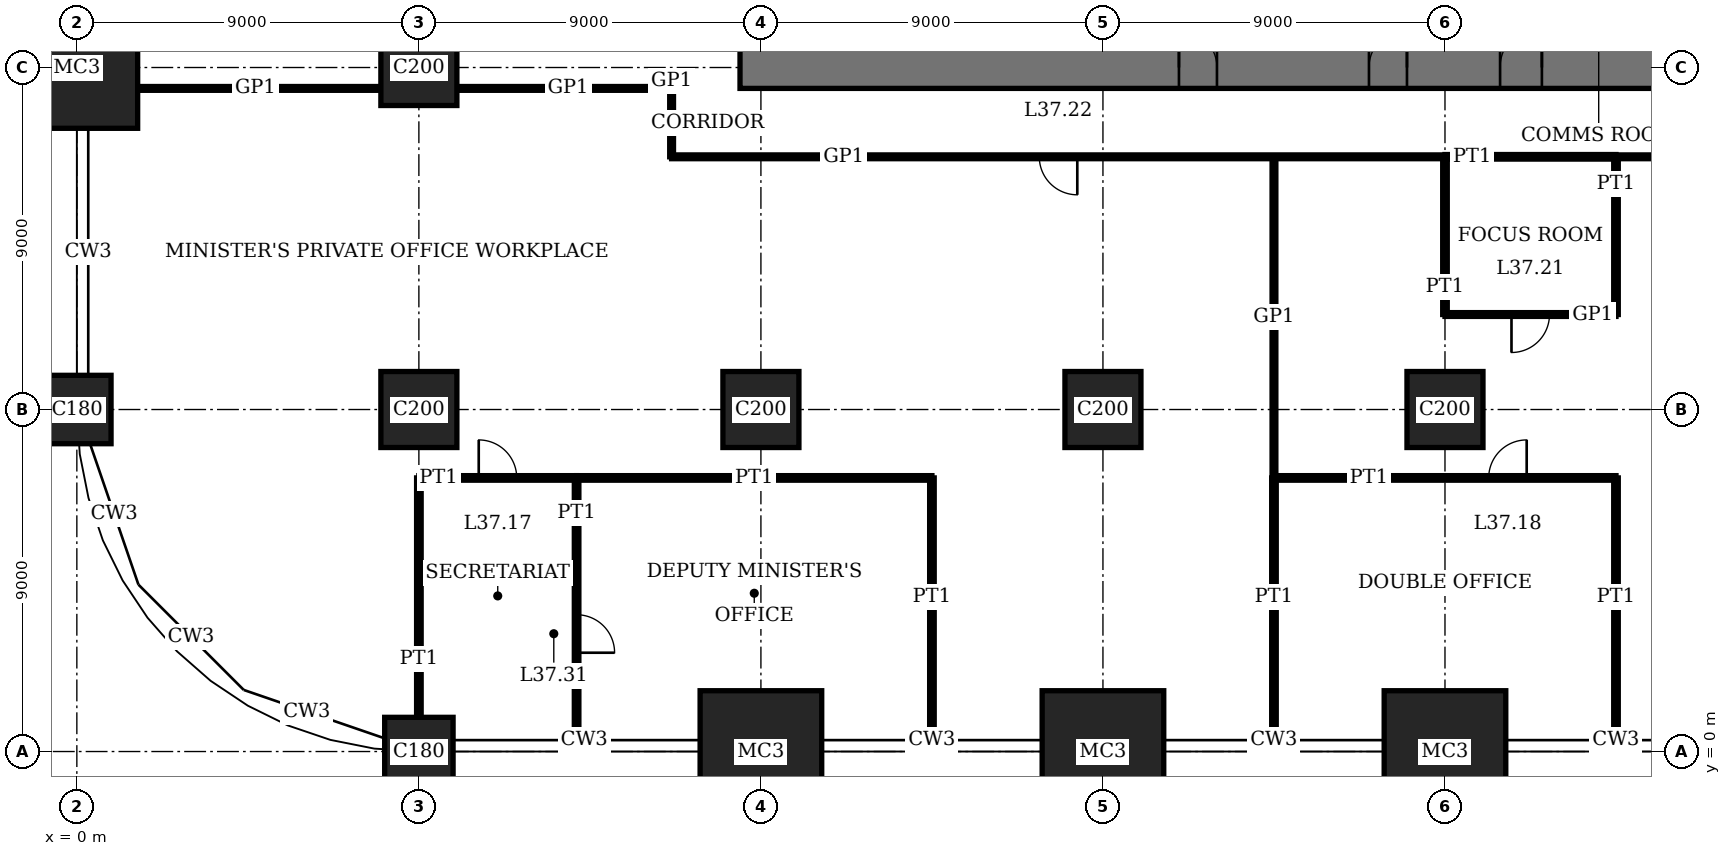
"""IFC4 building model, lengths in metres.
Left out: names, types, materials, properties, quantities, classifications, styles, units other than length and angle.
Written with IfcOpenShell. Run it as: python <this file> out.ifc"""

import sys

from ifc_helpers import new_model, si_unit, direction, frame, frame_2d, origin, origin_2d, place, context, subcontext, project, spatial, rectangle, extrude, element, fill, save


model = new_model("IFC4")
c1 = context("Model", 3, precision=1e-05, world=origin(), true_north=direction((0.0, 1.0)))
c2 = subcontext(c1, "Body", "Model", "MODEL_VIEW")
j1 = project(units=[si_unit("LENGTHUNIT", "METRE"), si_unit("PLANEANGLEUNIT", "RADIAN")], contexts=[c1])
p1 = place(None, origin())
s1 = spatial("IfcSite", under=j1, at=p1, CompositionType="ELEMENT")
p2 = place(p1, origin())
s2 = spatial("IfcBuilding", under=s1, at=p2, CompositionType="ELEMENT")
p3 = place(p2, frame((0.0, 0.0, 153.0)))
s3 = spatial("IfcBuildingStorey", under=s2, at=p3, CompositionType="ELEMENT", Elevation=153.0)
p4 = place(p3, frame((0.0, 9.0, 0.0), z_axis=(0.0, 0.0, 1.0), x_axis=(1.0, 0.0, 0.0)))
e1 = element("IfcColumn", 1, at=p4, inside=s3, PredefinedType="COLUMN", context=c2, shape_type="SweptSolid", body=[
    extrude(rectangle(XDim=1.8, YDim=1.8, at=origin_2d()), origin(), (0.0, 0.0, 1.0), 4.2),
])
p5 = place(p3, frame((0.0, 18.0, 0.0), z_axis=(0.0, 0.0, 1.0), x_axis=(1.0, 0.0, 0.0)))
e2 = element("IfcColumn", 2, at=p5, inside=s3, PredefinedType="COLUMN", context=c2, shape_type="SweptSolid", body=[
    extrude(rectangle(XDim=3.2, YDim=3.2, at=origin_2d()), origin(), (0.0, 0.0, 1.0), 4.2),
])
p6 = place(p3, frame((9.0, 0.0, 0.0), z_axis=(0.0, 0.0, 1.0), x_axis=(1.0, 0.0, 0.0)))
e3 = element("IfcColumn", 3, at=p6, inside=s3, PredefinedType="COLUMN", context=c2, shape_type="SweptSolid", body=[
    extrude(rectangle(XDim=1.8, YDim=1.8, at=origin_2d()), origin(), (0.0, 0.0, 1.0), 4.2),
])
for number, where, z_axis, x_axis in (
    (4, (9.0, 9.0, 0.0), (0.0, 0.0, 1.0), (1.0, 0.0, 0.0)),
    (5, (9.0, 18.0, 0.0), (0.0, 0.0, 1.0), (1.0, 0.0, 0.0)),
):
    element("IfcColumn", number, at=place(p3, frame(where, z_axis=z_axis, x_axis=x_axis)), inside=s3, PredefinedType="COLUMN", context=c2, shape_type="SweptSolid", body=[
        extrude(rectangle(XDim=2.0, YDim=2.0, at=origin_2d()), origin(), (0.0, 0.0, 1.0), 4.2),
    ])
p7 = place(p3, frame((18.0, 0.0, 0.0), z_axis=(0.0, 0.0, 1.0), x_axis=(1.0, 0.0, 0.0)))
e6 = element("IfcColumn", 6, at=p7, inside=s3, PredefinedType="COLUMN", context=c2, shape_type="SweptSolid", body=[
    extrude(rectangle(XDim=3.2, YDim=3.2, at=origin_2d()), origin(), (0.0, 0.0, 1.0), 4.2),
])
p8 = place(p3, frame((18.0, 9.0, 0.0), z_axis=(0.0, 0.0, 1.0), x_axis=(1.0, 0.0, 0.0)))
e7 = element("IfcColumn", 7, at=p8, inside=s3, PredefinedType="COLUMN", context=c2, shape_type="SweptSolid", body=[
    extrude(rectangle(XDim=2.0, YDim=2.0, at=origin_2d()), origin(), (0.0, 0.0, 1.0), 4.2),
])
p9 = place(p3, frame((27.0, 0.0, 0.0), z_axis=(0.0, 0.0, 1.0), x_axis=(1.0, 0.0, 0.0)))
e8 = element("IfcColumn", 8, at=p9, inside=s3, PredefinedType="COLUMN", context=c2, shape_type="SweptSolid", body=[
    extrude(rectangle(XDim=3.2, YDim=3.2, at=origin_2d()), origin(), (0.0, 0.0, 1.0), 4.2),
])
p10 = place(p3, frame((27.0, 9.0, 0.0), z_axis=(0.0, 0.0, 1.0), x_axis=(1.0, 0.0, 0.0)))
e9 = element("IfcColumn", 9, at=p10, inside=s3, PredefinedType="COLUMN", context=c2, shape_type="SweptSolid", body=[
    extrude(rectangle(XDim=2.0, YDim=2.0, at=origin_2d()), origin(), (0.0, 0.0, 1.0), 4.2),
])
p11 = place(p3, frame((36.0, 0.0, 0.0), z_axis=(0.0, 0.0, 1.0), x_axis=(1.0, 0.0, 0.0)))
e10 = element("IfcColumn", 10, at=p11, inside=s3, PredefinedType="COLUMN", context=c2, shape_type="SweptSolid", body=[
    extrude(rectangle(XDim=3.2, YDim=3.2, at=origin_2d()), origin(), (0.0, 0.0, 1.0), 4.2),
])
p12 = place(p3, frame((36.0, 9.0, 0.0), z_axis=(0.0, 0.0, 1.0), x_axis=(1.0, 0.0, 0.0)))
e11 = element("IfcColumn", 11, at=p12, inside=s3, PredefinedType="COLUMN", context=c2, shape_type="SweptSolid", body=[
    extrude(rectangle(XDim=2.0, YDim=2.0, at=origin_2d()), origin(), (0.0, 0.0, 1.0), 4.2),
])
p13 = place(p3, frame((17.45, 18.0, 0.0), z_axis=(0.0, 0.0, 1.0), x_axis=(1.0, 0.0, 0.0)))
e12 = element("IfcWall", 12, at=p13, inside=s3, PredefinedType="SHEAR", context=c2, shape_type="SweptSolid", body=[
    extrude(rectangle(XDim=28.1, YDim=1.1, at=frame_2d((14.05, 0.0))), origin(), (0.0, 0.0, 1.0), 4.2),
])
p14 = place(p13, frame((11.55, 0.0, 0.0)))
e13 = element("IfcOpeningElement", 13, at=p14, cuts=e12, PredefinedType="OPENING", context=c2, shape_type="SweptSolid", body=[
    extrude(rectangle(XDim=1.0, YDim=2.4, at=frame_2d((0.5, 1.2))), frame((0.0, 0.56, 0.0), z_axis=(0.0, -1.0, 0.0), x_axis=(1.0, 0.0, 0.0)), (0.0, 0.0, 1.0), 1.12),
])
p15 = place(p13, frame((16.55, 0.0, 0.0)))
e14 = element("IfcOpeningElement", 14, at=p15, cuts=e12, PredefinedType="OPENING", context=c2, shape_type="SweptSolid", body=[
    extrude(rectangle(XDim=1.0, YDim=2.4, at=frame_2d((0.5, 1.2))), frame((0.0, 0.56, 0.0), z_axis=(0.0, -1.0, 0.0), x_axis=(1.0, 0.0, 0.0)), (0.0, 0.0, 1.0), 1.12),
])
p16 = place(p13, frame((20.0, 0.0, 0.0)))
e15 = element("IfcOpeningElement", 15, at=p16, cuts=e12, PredefinedType="OPENING", context=c2, shape_type="SweptSolid", body=[
    extrude(rectangle(XDim=1.1, YDim=2.4, at=frame_2d((0.55, 1.2))), frame((0.0, 0.56, 0.0), z_axis=(0.0, -1.0, 0.0), x_axis=(1.0, 0.0, 0.0)), (0.0, 0.0, 1.0), 1.12),
])
p17 = place(p13, frame((24.05, 0.0, 0.0)))
e16 = element("IfcOpeningElement", 16, at=p17, cuts=e12, PredefinedType="OPENING", context=c2, shape_type="SweptSolid", body=[
    extrude(rectangle(XDim=1.0, YDim=2.4, at=frame_2d((0.5, 1.2))), frame((0.0, 0.56, 0.0), z_axis=(0.0, -1.0, 0.0), x_axis=(1.0, 0.0, 0.0)), (0.0, 0.0, 1.0), 1.12),
])
p18 = place(p3, frame((9.0, 7.2, 0.0), z_axis=(0.0, 0.0, 1.0), x_axis=(1.0, 0.0, 0.0)))
e17 = element("IfcWall", 17, at=p18, inside=s3, PredefinedType="PARTITIONING", context=c2, shape_type="SweptSolid", body=[
    extrude(rectangle(XDim=4.15, YDim=0.12, at=frame_2d((2.075, 0.0))), origin(), (0.0, 0.0, 1.0), 3.85),
])
p19 = place(p18, frame((1.575, 0.0, 0.0)))
e18 = element("IfcOpeningElement", 18, at=p19, cuts=e17, PredefinedType="OPENING", context=c2, shape_type="SweptSolid", body=[
    extrude(rectangle(XDim=1.0, YDim=2.4, at=frame_2d((0.5, 1.2))), frame((0.0, 0.07, 0.0), z_axis=(0.0, -1.0, 0.0), x_axis=(1.0, 0.0, 0.0)), (0.0, 0.0, 1.0), 0.14),
])
p20 = place(p3, frame((13.15, 7.2, 0.0), z_axis=(0.0, 0.0, 1.0), x_axis=(1.0, 0.0, 0.0)))
e19 = element("IfcWall", 19, at=p20, inside=s3, PredefinedType="PARTITIONING", context=c2, shape_type="SweptSolid", body=[
    extrude(rectangle(XDim=9.35, YDim=0.12, at=frame_2d((4.675, 0.0))), origin(), (0.0, 0.0, 1.0), 3.85),
])
p21 = place(p3, frame((31.5, 7.2, 0.0), z_axis=(0.0, 0.0, 1.0), x_axis=(1.0, 0.0, 0.0)))
e20 = element("IfcWall", 20, at=p21, inside=s3, PredefinedType="PARTITIONING", context=c2, shape_type="SweptSolid", body=[
    extrude(rectangle(XDim=9.0, YDim=0.12, at=frame_2d((4.5, 0.0))), origin(), (0.0, 0.0, 1.0), 3.85),
])
p22 = place(p21, frame((5.65, 0.0, 0.0)))
e21 = element("IfcOpeningElement", 21, at=p22, cuts=e20, PredefinedType="OPENING", context=c2, shape_type="SweptSolid", body=[
    extrude(rectangle(XDim=1.0, YDim=2.4, at=frame_2d((0.5, 1.2))), frame((0.0, 0.07, 0.0), z_axis=(0.0, -1.0, 0.0), x_axis=(1.0, 0.0, 0.0)), (0.0, 0.0, 1.0), 0.14),
])
p23 = place(p3, frame((36.0, 11.5, 0.0), z_axis=(0.0, 0.0, 1.0), x_axis=(1.0, 0.0, 0.0)))
e22 = element("IfcWall", 22, at=p23, inside=s3, PredefinedType="PARTITIONING", context=c2, shape_type="SweptSolid", body=[
    extrude(rectangle(XDim=4.5, YDim=0.1, at=frame_2d((2.25, 0.0))), origin(), (0.0, 0.0, 1.0), 3.85),
])
p24 = place(p23, frame((1.75, 0.0, 0.0)))
e23 = element("IfcOpeningElement", 23, at=p24, cuts=e22, PredefinedType="OPENING", context=c2, shape_type="SweptSolid", body=[
    extrude(rectangle(XDim=1.0, YDim=2.4, at=frame_2d((0.5, 1.2))), frame((0.0, 0.06, 0.0), z_axis=(0.0, -1.0, 0.0), x_axis=(1.0, 0.0, 0.0)), (0.0, 0.0, 1.0), 0.12),
])
p25 = place(p3, frame((36.0, 15.65, 0.0), z_axis=(0.0, 0.0, 1.0), x_axis=(1.0, 0.0, 0.0)))
e24 = element("IfcWall", 24, at=p25, inside=s3, PredefinedType="PARTITIONING", context=c2, shape_type="SweptSolid", body=[
    extrude(rectangle(XDim=4.5, YDim=0.12, at=frame_2d((2.25, 0.0))), origin(), (0.0, 0.0, 1.0), 3.85),
])
p26 = place(p3, frame((15.65, 15.65, 0.0), z_axis=(0.0, 0.0, 1.0), x_axis=(1.0, 0.0, 0.0)))
e25 = element("IfcWall", 25, at=p26, inside=s3, PredefinedType="PARTITIONING", context=c2, shape_type="SweptSolid", body=[
    extrude(rectangle(XDim=20.35, YDim=0.1, at=frame_2d((10.175, 0.0))), origin(), (0.0, 0.0, 1.0), 3.85),
])
p27 = place(p26, frame((9.675, 0.0, 0.0)))
e26 = element("IfcOpeningElement", 26, at=p27, cuts=e25, PredefinedType="OPENING", context=c2, shape_type="SweptSolid", body=[
    extrude(rectangle(XDim=1.0, YDim=2.4, at=frame_2d((0.5, 1.2))), frame((0.0, 0.06, 0.0), z_axis=(0.0, -1.0, 0.0), x_axis=(1.0, 0.0, 0.0)), (0.0, 0.0, 1.0), 0.12),
])
p28 = place(p3, frame((40.5, 15.65, 0.0), z_axis=(0.0, 0.0, 1.0), x_axis=(1.0, 0.0, 0.0)))
e27 = element("IfcWall", 27, at=p28, inside=s3, PredefinedType="PARTITIONING", context=c2, shape_type="SweptSolid", body=[
    extrude(rectangle(XDim=6.85, YDim=0.1, at=frame_2d((3.425, 0.0))), origin(), (0.0, 0.0, 1.0), 3.85),
])
p29 = place(p28, frame((2.925, 0.0, 0.0)))
e28 = element("IfcOpeningElement", 28, at=p29, cuts=e27, PredefinedType="OPENING", context=c2, shape_type="SweptSolid", body=[
    extrude(rectangle(XDim=1.0, YDim=2.4, at=frame_2d((0.5, 1.2))), frame((0.0, 0.06, 0.0), z_axis=(0.0, -1.0, 0.0), x_axis=(1.0, 0.0, 0.0)), (0.0, 0.0, 1.0), 0.12),
])
p30 = place(p3, frame((1.6, 17.45, 0.0), z_axis=(0.0, 0.0, 1.0), x_axis=(1.0, 0.0, 0.0)))
e29 = element("IfcWall", 29, at=p30, inside=s3, PredefinedType="PARTITIONING", context=c2, shape_type="SweptSolid", body=[
    extrude(rectangle(XDim=6.4, YDim=0.1, at=frame_2d((3.2, 0.0))), origin(), (0.0, 0.0, 1.0), 3.85),
])
p31 = place(p3, frame((10.0, 17.45, 0.0), z_axis=(0.0, 0.0, 1.0), x_axis=(1.0, 0.0, 0.0)))
e30 = element("IfcWall", 30, at=p31, inside=s3, PredefinedType="PARTITIONING", context=c2, shape_type="SweptSolid", body=[
    extrude(rectangle(XDim=5.65, YDim=0.1, at=frame_2d((2.825, 0.0))), origin(), (0.0, 0.0, 1.0), 3.85),
])
p32 = place(p3, frame((9.0, 0.9, 0.0), z_axis=(0.0, 0.0, 1.0), x_axis=(0.0, 1.0, 0.0)))
e31 = element("IfcWall", 31, at=p32, inside=s3, PredefinedType="PARTITIONING", context=c2, shape_type="SweptSolid", body=[
    extrude(rectangle(XDim=6.3, YDim=0.12, at=frame_2d((3.15, 0.0))), origin(), (0.0, 0.0, 1.0), 3.05),
])
p33 = place(p3, frame((13.15, 0.31, 0.0), z_axis=(0.0, 0.0, 1.0), x_axis=(0.0, 1.0, 0.0)))
e32 = element("IfcWall", 32, at=p33, inside=s3, PredefinedType="PARTITIONING", context=c2, shape_type="SweptSolid", body=[
    extrude(rectangle(XDim=6.89, YDim=0.12, at=frame_2d((3.445, 0.0))), origin(), (0.0, 0.0, 1.0), 3.85),
])
p34 = place(p33, frame((2.29, 0.0, 0.0)))
e33 = element("IfcOpeningElement", 33, at=p34, cuts=e32, PredefinedType="OPENING", context=c2, shape_type="SweptSolid", body=[
    extrude(rectangle(XDim=1.0, YDim=2.4, at=frame_2d((0.5, 1.2))), frame((0.0, 0.07, 0.0), z_axis=(0.0, -1.0, 0.0), x_axis=(1.0, 0.0, 0.0)), (0.0, 0.0, 1.0), 0.14),
])
p35 = place(p3, frame((15.65, 15.65, 0.0), z_axis=(0.0, 0.0, 1.0), x_axis=(0.0, 1.0, 0.0)))
e34 = element("IfcWall", 34, at=p35, inside=s3, PredefinedType="PARTITIONING", context=c2, shape_type="SweptSolid", body=[
    extrude(rectangle(XDim=1.8, YDim=0.1, at=frame_2d((0.9, 0.0))), origin(), (0.0, 0.0, 1.0), 3.85),
])
for number, where, z_axis, x_axis in (
    (35, (22.5, 0.31, 0.0), (0.0, 0.0, 1.0), (0.0, 1.0, 0.0)),
    (36, (31.5, 0.31, 0.0), (0.0, 0.0, 1.0), (0.0, 1.0, 0.0)),
):
    element("IfcWall", number, at=place(p3, frame(where, z_axis=z_axis, x_axis=x_axis)), inside=s3, PredefinedType="PARTITIONING", context=c2, shape_type="SweptSolid", body=[
        extrude(rectangle(XDim=6.89, YDim=0.12, at=frame_2d((3.445, 0.0))), origin(), (0.0, 0.0, 1.0), 3.85),
    ])
p36 = place(p3, frame((31.5, 7.2, 0.0), z_axis=(0.0, 0.0, 1.0), x_axis=(0.0, 1.0, 0.0)))
e37 = element("IfcWall", 37, at=p36, inside=s3, PredefinedType="PARTITIONING", context=c2, shape_type="SweptSolid", body=[
    extrude(rectangle(XDim=8.45, YDim=0.1, at=frame_2d((4.225, 0.0))), origin(), (0.0, 0.0, 1.0), 3.85),
])
p37 = place(p3, frame((36.0, 11.5, 0.0), z_axis=(0.0, 0.0, 1.0), x_axis=(0.0, 1.0, 0.0)))
e38 = element("IfcWall", 38, at=p37, inside=s3, PredefinedType="PARTITIONING", context=c2, shape_type="SweptSolid", body=[
    extrude(rectangle(XDim=4.15, YDim=0.12, at=frame_2d((2.075, 0.0))), origin(), (0.0, 0.0, 1.0), 3.25),
])
p38 = place(p3, frame((40.5, 0.31, 0.0), z_axis=(0.0, 0.0, 1.0), x_axis=(0.0, 1.0, 0.0)))
e39 = element("IfcWall", 39, at=p38, inside=s3, PredefinedType="PARTITIONING", context=c2, shape_type="SweptSolid", body=[
    extrude(rectangle(XDim=6.89, YDim=0.12, at=frame_2d((3.445, 0.0))), origin(), (0.0, 0.0, 1.0), 3.85),
])
p39 = place(p3, frame((40.5, 11.5, 0.0), z_axis=(0.0, 0.0, 1.0), x_axis=(0.0, 1.0, 0.0)))
e40 = element("IfcWall", 40, at=p39, inside=s3, PredefinedType="PARTITIONING", context=c2, shape_type="SweptSolid", body=[
    extrude(rectangle(XDim=4.15, YDim=0.12, at=frame_2d((2.075, 0.0))), origin(), (0.0, 0.0, 1.0), 3.85),
])
p40 = place(p14, origin())
e41 = element("IfcDoor", 41, at=p40, inside=s3, OperationType="SINGLE_SWING_RIGHT", PredefinedType="DOOR", context=c2, shape_type="SweptSolid", body=[
    extrude(rectangle(XDim=1.0, YDim=2.4, at=frame_2d((0.5, 1.2))), frame((0.0, 0.025, 0.0), z_axis=(0.0, -1.0, 0.0), x_axis=(1.0, 0.0, 0.0)), (0.0, 0.0, 1.0), 0.05),
    extrude(rectangle(XDim=0.04, YDim=2.4, at=frame_2d((0.02, 1.2))), frame((0.0, 0.4, 0.0), z_axis=(0.0, -1.0, 0.0), x_axis=(1.0, 0.0, 0.0)), (0.0, 0.0, 1.0), 0.8),
    extrude(rectangle(XDim=0.04, YDim=2.4, at=frame_2d((0.98, 1.2))), frame((0.0, 0.4, 0.0), z_axis=(0.0, -1.0, 0.0), x_axis=(1.0, 0.0, 0.0)), (0.0, 0.0, 1.0), 0.8),
    extrude(rectangle(XDim=1.0, YDim=0.04, at=frame_2d((0.5, 2.38))), frame((0.0, 0.4, 0.0), z_axis=(0.0, -1.0, 0.0), x_axis=(1.0, 0.0, 0.0)), (0.0, 0.0, 1.0), 0.8),
])
fill(e13, e41)
p41 = place(p15, origin())
e42 = element("IfcDoor", 42, at=p41, inside=s3, OperationType="SINGLE_SWING_LEFT", PredefinedType="DOOR", context=c2, shape_type="SweptSolid", body=[
    extrude(rectangle(XDim=1.0, YDim=2.4, at=frame_2d((0.5, 1.2))), frame((0.0, 0.025, 0.0), z_axis=(0.0, -1.0, 0.0), x_axis=(1.0, 0.0, 0.0)), (0.0, 0.0, 1.0), 0.05),
    extrude(rectangle(XDim=0.04, YDim=2.4, at=frame_2d((0.02, 1.2))), frame((0.0, 0.4, 0.0), z_axis=(0.0, -1.0, 0.0), x_axis=(1.0, 0.0, 0.0)), (0.0, 0.0, 1.0), 0.8),
    extrude(rectangle(XDim=0.04, YDim=2.4, at=frame_2d((0.98, 1.2))), frame((0.0, 0.4, 0.0), z_axis=(0.0, -1.0, 0.0), x_axis=(1.0, 0.0, 0.0)), (0.0, 0.0, 1.0), 0.8),
    extrude(rectangle(XDim=1.0, YDim=0.04, at=frame_2d((0.5, 2.38))), frame((0.0, 0.4, 0.0), z_axis=(0.0, -1.0, 0.0), x_axis=(1.0, 0.0, 0.0)), (0.0, 0.0, 1.0), 0.8),
])
fill(e14, e42)
p42 = place(p16, origin())
e43 = element("IfcDoor", 43, at=p42, inside=s3, OperationType="SINGLE_SWING_LEFT", PredefinedType="DOOR", context=c2, shape_type="SweptSolid", body=[
    extrude(rectangle(XDim=1.1, YDim=2.4, at=frame_2d((0.55, 1.2))), frame((0.0, 0.025, 0.0), z_axis=(0.0, -1.0, 0.0), x_axis=(1.0, 0.0, 0.0)), (0.0, 0.0, 1.0), 0.05),
    extrude(rectangle(XDim=0.04, YDim=2.4, at=frame_2d((0.02, 1.2))), frame((0.0, 0.44, 0.0), z_axis=(0.0, -1.0, 0.0), x_axis=(1.0, 0.0, 0.0)), (0.0, 0.0, 1.0), 0.88),
    extrude(rectangle(XDim=0.04, YDim=2.4, at=frame_2d((1.08, 1.2))), frame((0.0, 0.44, 0.0), z_axis=(0.0, -1.0, 0.0), x_axis=(1.0, 0.0, 0.0)), (0.0, 0.0, 1.0), 0.88),
    extrude(rectangle(XDim=1.1, YDim=0.04, at=frame_2d((0.55, 2.38))), frame((0.0, 0.44, 0.0), z_axis=(0.0, -1.0, 0.0), x_axis=(1.0, 0.0, 0.0)), (0.0, 0.0, 1.0), 0.88),
])
fill(e15, e43)
p43 = place(p19, origin())
e44 = element("IfcDoor", 44, at=p43, inside=s3, OperationType="SINGLE_SWING_RIGHT", PredefinedType="DOOR", context=c2, shape_type="SweptSolid", body=[
    extrude(rectangle(XDim=1.0, YDim=2.4, at=frame_2d((0.5, 1.2))), frame((0.0, 0.025, 0.0), z_axis=(0.0, -1.0, 0.0), x_axis=(1.0, 0.0, 0.0)), (0.0, 0.0, 1.0), 0.05),
])
fill(e18, e44)
p44 = place(p22, origin())
e45 = element("IfcDoor", 45, at=p44, inside=s3, OperationType="SINGLE_SWING_LEFT", PredefinedType="DOOR", context=c2, shape_type="SweptSolid", body=[
    extrude(rectangle(XDim=1.0, YDim=2.4, at=frame_2d((0.5, 1.2))), frame((0.0, 0.025, 0.0), z_axis=(0.0, -1.0, 0.0), x_axis=(1.0, 0.0, 0.0)), (0.0, 0.0, 1.0), 0.05),
])
fill(e21, e45)
p45 = place(p24, origin())
e46 = element("IfcDoor", 46, at=p45, inside=s3, OperationType="SINGLE_SWING_LEFT", PredefinedType="DOOR", context=c2, shape_type="SweptSolid", body=[
    extrude(rectangle(XDim=1.0, YDim=2.4, at=frame_2d((0.5, 1.2))), frame((0.0, 0.02, 0.0), z_axis=(0.0, -1.0, 0.0), x_axis=(1.0, 0.0, 0.0)), (0.0, 0.0, 1.0), 0.04),
])
fill(e23, e46)
p46 = place(p27, origin())
e47 = element("IfcDoor", 47, at=p46, inside=s3, OperationType="SINGLE_SWING_RIGHT", PredefinedType="DOOR", context=c2, shape_type="SweptSolid", body=[
    extrude(rectangle(XDim=1.0, YDim=2.4, at=frame_2d((0.5, 1.2))), frame((0.0, 0.02, 0.0), z_axis=(0.0, -1.0, 0.0), x_axis=(1.0, 0.0, 0.0)), (0.0, 0.0, 1.0), 0.04),
])
fill(e26, e47)
p47 = place(p34, origin())
e48 = element("IfcDoor", 48, at=p47, inside=s3, OperationType="SINGLE_SWING_LEFT", PredefinedType="DOOR", context=c2, shape_type="SweptSolid", body=[
    extrude(rectangle(XDim=1.0, YDim=2.4, at=frame_2d((0.5, 1.2))), frame((0.0, 0.025, 0.0), z_axis=(0.0, -1.0, 0.0), x_axis=(1.0, 0.0, 0.0)), (0.0, 0.0, 1.0), 0.05),
])
fill(e33, e48)
save(model, sys.argv[1])
